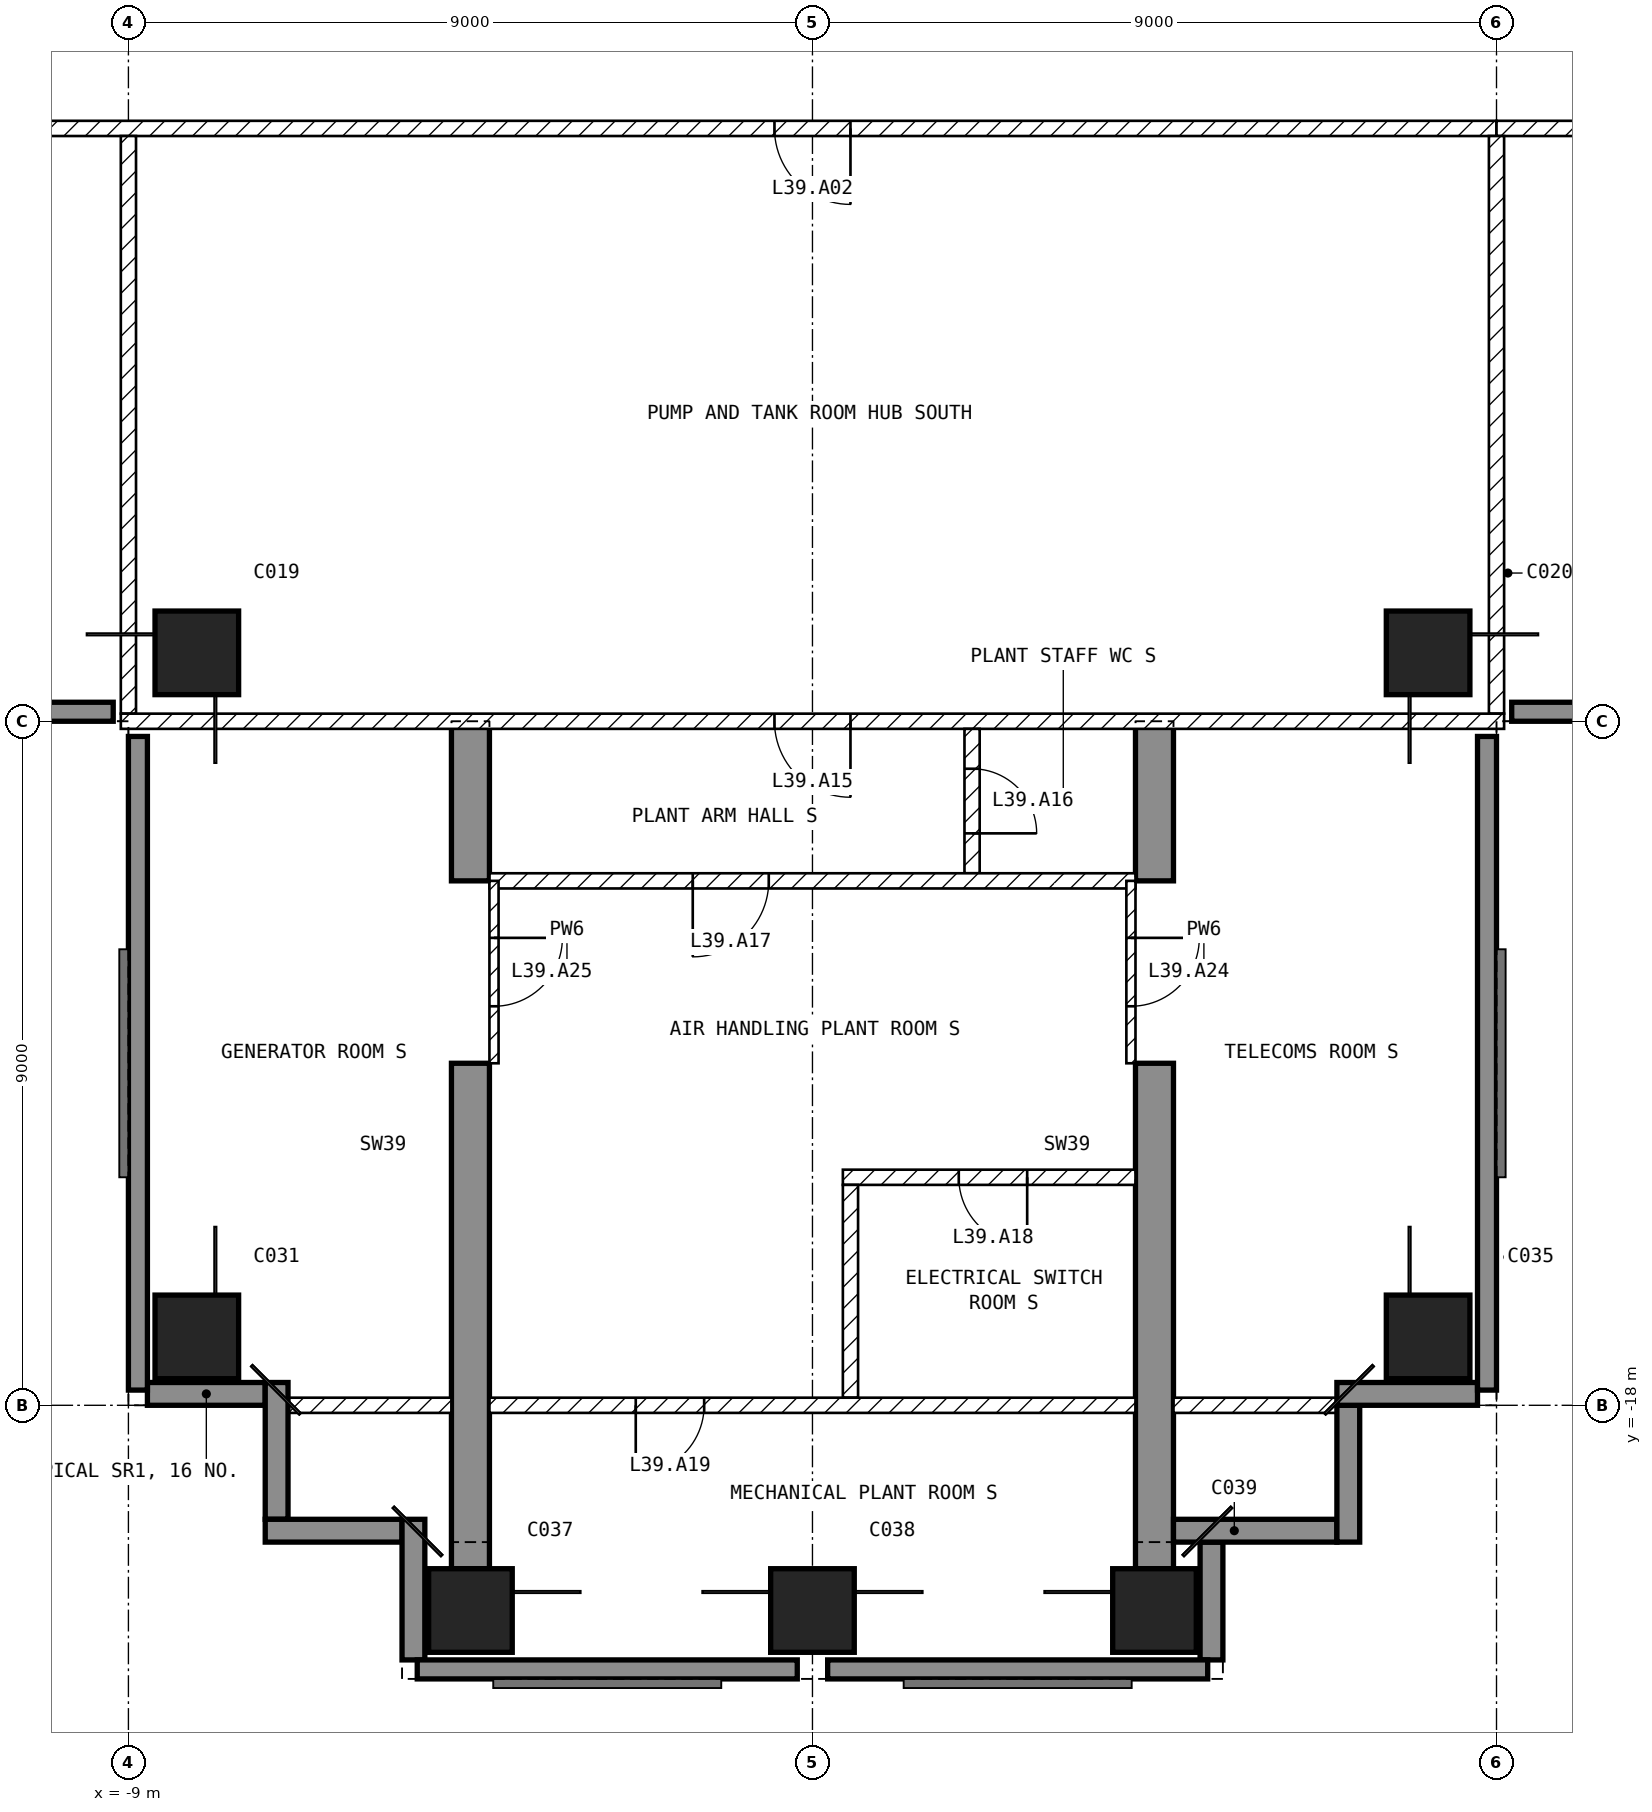
"""IFC4 building model, lengths in metres.
Left out: names, types, materials, properties, quantities, classifications, styles, units other than length and angle.
Written with IfcOpenShell. Run it as: python <this file> out.ifc"""

import sys

from ifc_helpers import new_model, si_unit, direction, frame, frame_2d, origin, origin_2d, place, context, subcontext, project, spatial, polyline, rectangle, outline, extrude, element, fill, save


model = new_model("IFC4")
c1 = context("Model", 3, precision=1e-05, world=origin(), true_north=direction((0.0, 1.0)))
c2 = subcontext(c1, "Body", "Model", "MODEL_VIEW")
j1 = project(units=[si_unit("LENGTHUNIT", "METRE"), si_unit("PLANEANGLEUNIT", "RADIAN")], contexts=[c1])
p1 = place(None, origin())
s1 = spatial("IfcSite", under=j1, at=p1, CompositionType="ELEMENT")
p2 = place(p1, origin())
s2 = spatial("IfcBuilding", under=s1, at=p2, CompositionType="ELEMENT")
p3 = place(p2, frame((0.0, 0.0, 162.1)))
s3 = spatial("IfcBuildingStorey", under=s2, at=p3, CompositionType="ELEMENT", Elevation=162.1)
for number, where, z_axis, x_axis in (
    (1, (-8.1, -17.1, -0.45), (0.0, 0.0, 1.0), (1.0, 0.0, 0.0)),
    (2, (-8.1, -8.1, -0.45), (0.0, 0.0, 1.0), (1.0, 0.0, 0.0)),
    (3, (-4.5, -20.7, -0.45), (0.0, 0.0, 1.0), (1.0, 0.0, 0.0)),
    (4, (0.0, -20.7, -0.45), (0.0, 0.0, 1.0), (1.0, 0.0, 0.0)),
    (5, (4.5, -20.7, -0.45), (0.0, 0.0, 1.0), (1.0, 0.0, 0.0)),
    (6, (8.1, -17.1, -0.45), (0.0, 0.0, 1.0), (1.0, 0.0, 0.0)),
    (7, (8.1, -8.1, -0.45), (0.0, 0.0, 1.0), (1.0, 0.0, 0.0)),
):
    element("IfcColumn", number, at=place(p3, frame(where, z_axis=z_axis, x_axis=x_axis)), inside=s3, PredefinedType="COLUMN", context=c2, shape_type="SweptSolid", body=[
        extrude(rectangle(XDim=1.1, YDim=1.1, at=origin_2d()), origin(), (0.0, 0.0, 1.0), 4.7),
    ])
for number, where, z_axis, x_axis in (
    (8, (-4.75, -20.15, -0.45), (1.0, 0.0, 0.0), (0.0, 1.0, 0.0)),
    (9, (4.25, -20.15, -0.45), (1.0, 0.0, 0.0), (0.0, 1.0, 0.0)),
):
    element("IfcWall", number, at=place(p3, frame(where, z_axis=z_axis, x_axis=x_axis)), inside=s3, PredefinedType="SHEAR", context=c2, shape_type="SweptSolid", body=[
        extrude(outline(polyline([(0.0, 0.0), (6.65, 0.0), (6.65, 2.85), (9.05, 2.85), (9.05, 0.0), (11.15, 0.0), (11.15, 4.7), (0.0, 4.7), (0.0, 0.0)])), origin(), (0.0, 0.0, 1.0), 0.5),
    ])
for number, where, z_axis, x_axis in (
    (10, (-17.8, -8.875, 0.0), (0.0, 0.0, 1.0), (1.0, 0.0, 0.0)),
    (11, (-8.875, -9.2, 0.0), (0.0, 0.0, 1.0), (0.0, -1.0, 0.0)),
):
    element("IfcWall", number, at=place(p3, frame(where, z_axis=z_axis, x_axis=x_axis)), inside=s3, PredefinedType="SOLIDWALL", context=c2, shape_type="SweptSolid", body=[
        extrude(rectangle(XDim=8.6, YDim=0.25, at=frame_2d((4.3, 0.0))), origin(), (0.0, 0.0, 1.0), 4.25),
    ])
for number, where, z_axis, x_axis in (
    (12, (-5.2, -21.475, 0.0), (0.0, 0.0, 1.0), (1.0, 0.0, 0.0)),
    (13, (0.2, -21.475, 0.0), (0.0, 0.0, 1.0), (1.0, 0.0, 0.0)),
):
    element("IfcWall", number, at=place(p3, frame(where, z_axis=z_axis, x_axis=x_axis)), inside=s3, PredefinedType="SOLIDWALL", context=c2, shape_type="SweptSolid", body=[
        extrude(rectangle(XDim=5.0, YDim=0.25, at=frame_2d((2.5, 0.0))), origin(), (0.0, 0.0, 1.0), 4.25),
    ])
for number, where, z_axis, x_axis in (
    (14, (8.875, -17.8, 0.0), (0.0, 0.0, 1.0), (0.0, 1.0, 0.0)),
    (15, (9.2, -8.875, 0.0), (0.0, 0.0, 1.0), (1.0, 0.0, 0.0)),
):
    element("IfcWall", number, at=place(p3, frame(where, z_axis=z_axis, x_axis=x_axis)), inside=s3, PredefinedType="SOLIDWALL", context=c2, shape_type="SweptSolid", body=[
        extrude(rectangle(XDim=8.6, YDim=0.25, at=frame_2d((4.3, 0.0))), origin(), (0.0, 0.0, 1.0), 4.25),
    ])
p4 = place(p3, frame((5.25, -21.35, 0.0), z_axis=(0.0, 0.0, 1.0), x_axis=(0.0, 1.0, 0.0)))
e16 = element("IfcWall", 16, at=p4, inside=s3, PredefinedType="SOLIDWALL", context=c2, shape_type="SweptSolid", body=[
    extrude(rectangle(XDim=1.55, YDim=0.3, at=frame_2d((0.775, 0.0))), origin(), (0.0, 0.0, 1.0), 4.25),
])
p5 = place(p3, frame((4.75, -19.65, 0.0), z_axis=(0.0, 0.0, 1.0), x_axis=(1.0, 0.0, 0.0)))
e17 = element("IfcWall", 17, at=p5, inside=s3, PredefinedType="SOLIDWALL", context=c2, shape_type="SweptSolid", body=[
    extrude(rectangle(XDim=2.15, YDim=0.3, at=frame_2d((1.075, 0.0))), origin(), (0.0, 0.0, 1.0), 4.25),
])
p6 = place(p3, frame((7.05, -19.8, 0.0), z_axis=(0.0, 0.0, 1.0), x_axis=(0.0, 1.0, 0.0)))
e18 = element("IfcWall", 18, at=p6, inside=s3, PredefinedType="SOLIDWALL", context=c2, shape_type="SweptSolid", body=[
    extrude(rectangle(XDim=1.8, YDim=0.3, at=frame_2d((0.9, 0.0))), origin(), (0.0, 0.0, 1.0), 4.25),
])
p7 = place(p3, frame((6.9, -17.85, 0.0), z_axis=(0.0, 0.0, 1.0), x_axis=(1.0, 0.0, 0.0)))
e19 = element("IfcWall", 19, at=p7, inside=s3, PredefinedType="SOLIDWALL", context=c2, shape_type="SweptSolid", body=[
    extrude(rectangle(XDim=1.85, YDim=0.3, at=frame_2d((0.925, 0.0))), origin(), (0.0, 0.0, 1.0), 4.25),
])
p8 = place(p3, frame((-8.75, -17.85, 0.0), z_axis=(0.0, 0.0, 1.0), x_axis=(1.0, 0.0, 0.0)))
e20 = element("IfcWall", 20, at=p8, inside=s3, PredefinedType="SOLIDWALL", context=c2, shape_type="SweptSolid", body=[
    extrude(rectangle(XDim=1.55, YDim=0.3, at=frame_2d((0.775, 0.0))), origin(), (0.0, 0.0, 1.0), 4.25),
])
for number, where, z_axis, x_axis in (
    (21, (-7.05, -17.7, 0.0), (0.0, 0.0, 1.0), (0.0, -1.0, 0.0)),
    (22, (-7.2, -19.65, 0.0), (0.0, 0.0, 1.0), (1.0, 0.0, 0.0)),
):
    element("IfcWall", number, at=place(p3, frame(where, z_axis=z_axis, x_axis=x_axis)), inside=s3, PredefinedType="SOLIDWALL", context=c2, shape_type="SweptSolid", body=[
        extrude(rectangle(XDim=1.8, YDim=0.3, at=frame_2d((0.9, 0.0))), origin(), (0.0, 0.0, 1.0), 4.25),
    ])
p9 = place(p3, frame((-5.25, -19.5, 0.0), z_axis=(0.0, 0.0, 1.0), x_axis=(0.0, -1.0, 0.0)))
e23 = element("IfcWall", 23, at=p9, inside=s3, PredefinedType="SOLIDWALL", context=c2, shape_type="SweptSolid", body=[
    extrude(rectangle(XDim=1.85, YDim=0.3, at=frame_2d((0.925, 0.0))), origin(), (0.0, 0.0, 1.0), 4.25),
])
p10 = place(p3, frame((9.0, -1.2, 0.0), z_axis=(0.0, 0.0, 1.0), x_axis=(-1.0, 0.0, 0.0)))
e24 = element("IfcWall", 24, at=p10, inside=s3, PredefinedType="PARTITIONING", context=c2, shape_type="SweptSolid", body=[
    extrude(rectangle(XDim=30.6, YDim=0.2, at=frame_2d((15.3, 0.0))), origin(), (0.0, 0.0, 1.0), 4.25),
])
p11 = place(p10, frame((8.5, 0.0, 0.0)))
e25 = element("IfcOpeningElement", 25, at=p11, cuts=e24, PredefinedType="OPENING", context=c2, shape_type="SweptSolid", body=[
    extrude(rectangle(XDim=1.0, YDim=2.1, at=frame_2d((0.5, 1.05))), frame((0.0, 0.11, 0.0), z_axis=(0.0, -1.0, 0.0), x_axis=(1.0, 0.0, 0.0)), (0.0, 0.0, 1.0), 0.22),
])
p12 = place(p10, frame((21.4, 0.0, 0.0)))
e26 = element("IfcOpeningElement", 26, at=p12, cuts=e24, PredefinedType="OPENING", context=c2, shape_type="SweptSolid", body=[
    extrude(rectangle(XDim=1.0, YDim=2.1, at=frame_2d((0.5, 1.05))), frame((0.0, 0.11, 0.0), z_axis=(0.0, -1.0, 0.0), x_axis=(1.0, 0.0, 0.0)), (0.0, 0.0, 1.0), 0.22),
])
p13 = place(p10, frame((27.35, 0.0, 0.0)))
e27 = element("IfcOpeningElement", 27, at=p13, cuts=e24, PredefinedType="OPENING", context=c2, shape_type="SweptSolid", body=[
    extrude(rectangle(XDim=1.0, YDim=2.1, at=frame_2d((0.5, 1.05))), frame((0.0, 0.11, 0.0), z_axis=(0.0, -1.0, 0.0), x_axis=(1.0, 0.0, 0.0)), (0.0, 0.0, 1.0), 0.22),
])
p14 = place(p3, frame((21.6, -1.2, 0.0), z_axis=(0.0, 0.0, 1.0), x_axis=(-1.0, 0.0, 0.0)))
e28 = element("IfcWall", 28, at=p14, inside=s3, PredefinedType="PARTITIONING", context=c2, shape_type="SweptSolid", body=[
    extrude(rectangle(XDim=12.6, YDim=0.2, at=frame_2d((6.3, 0.0))), origin(), (0.0, 0.0, 1.0), 4.25),
])
p15 = place(p14, frame((5.75, 0.0, 0.0)))
e29 = element("IfcOpeningElement", 29, at=p15, cuts=e28, PredefinedType="OPENING", context=c2, shape_type="SweptSolid", body=[
    extrude(rectangle(XDim=1.1, YDim=2.1, at=frame_2d((0.55, 1.05))), frame((0.0, 0.11, 0.0), z_axis=(0.0, -1.0, 0.0), x_axis=(1.0, 0.0, 0.0)), (0.0, 0.0, 1.0), 0.22),
])
for number, where, z_axis, x_axis in (
    (30, (9.0, -1.3, 0.0), (0.0, 0.0, 1.0), (0.0, -1.0, 0.0)),
    (31, (-9.0, -8.9, 0.0), (0.0, 0.0, 1.0), (0.0, 1.0, 0.0)),
):
    element("IfcWall", number, at=place(p3, frame(where, z_axis=z_axis, x_axis=x_axis)), inside=s3, PredefinedType="PARTITIONING", context=c2, shape_type="SweptSolid", body=[
        extrude(rectangle(XDim=7.6, YDim=0.2, at=frame_2d((3.8, 0.0))), origin(), (0.0, 0.0, 1.0), 4.25),
    ])
p16 = place(p3, frame((9.1, -9.0, 0.0), z_axis=(0.0, 0.0, 1.0), x_axis=(-1.0, 0.0, 0.0)))
e32 = element("IfcWall", 32, at=p16, inside=s3, PredefinedType="PARTITIONING", context=c2, shape_type="SweptSolid", body=[
    extrude(rectangle(XDim=18.2, YDim=0.2, at=frame_2d((9.1, 0.0))), origin(), (0.0, 0.0, 1.0), 4.25),
])
p17 = place(p16, frame((8.6, 0.0, 0.0)))
e33 = element("IfcOpeningElement", 33, at=p17, cuts=e32, PredefinedType="OPENING", context=c2, shape_type="SweptSolid", body=[
    extrude(rectangle(XDim=1.0, YDim=2.1, at=frame_2d((0.5, 1.05))), frame((0.0, 0.11, 0.0), z_axis=(0.0, -1.0, 0.0), x_axis=(1.0, 0.0, 0.0)), (0.0, 0.0, 1.0), 0.22),
])
p18 = place(p3, frame((2.1, -9.1, 0.0), z_axis=(0.0, 0.0, 1.0), x_axis=(0.0, -1.0, 0.0)))
e34 = element("IfcWall", 34, at=p18, inside=s3, PredefinedType="PARTITIONING", context=c2, shape_type="SweptSolid", body=[
    extrude(rectangle(XDim=1.9, YDim=0.2, at=frame_2d((0.95, 0.0))), origin(), (0.0, 0.0, 1.0), 4.25),
])
p19 = place(p18, frame((0.525, 0.0, 0.0)))
e35 = element("IfcOpeningElement", 35, at=p19, cuts=e34, PredefinedType="OPENING", context=c2, shape_type="SweptSolid", body=[
    extrude(rectangle(XDim=0.85, YDim=2.1, at=frame_2d((0.425, 1.05))), frame((0.0, 0.11, 0.0), z_axis=(0.0, -1.0, 0.0), x_axis=(1.0, 0.0, 0.0)), (0.0, 0.0, 1.0), 0.22),
])
p20 = place(p3, frame((4.25, -11.1, 0.0), z_axis=(0.0, 0.0, 1.0), x_axis=(-1.0, 0.0, 0.0)))
e36 = element("IfcWall", 36, at=p20, inside=s3, PredefinedType="PARTITIONING", context=c2, shape_type="SweptSolid", body=[
    extrude(rectangle(XDim=8.5, YDim=0.2, at=frame_2d((4.25, 0.0))), origin(), (0.0, 0.0, 1.0), 4.25),
])
p21 = place(p20, frame((4.825, 0.0, 0.0)))
e37 = element("IfcOpeningElement", 37, at=p21, cuts=e36, PredefinedType="OPENING", context=c2, shape_type="SweptSolid", body=[
    extrude(rectangle(XDim=1.0, YDim=2.1, at=frame_2d((0.5, 1.05))), frame((0.0, 0.11, 0.0), z_axis=(0.0, -1.0, 0.0), x_axis=(1.0, 0.0, 0.0)), (0.0, 0.0, 1.0), 0.22),
])
p22 = place(p3, frame((4.25, -15.0, 0.0), z_axis=(0.0, 0.0, 1.0), x_axis=(-1.0, 0.0, 0.0)))
e38 = element("IfcWall", 38, at=p22, inside=s3, PredefinedType="PARTITIONING", context=c2, shape_type="SweptSolid", body=[
    extrude(rectangle(XDim=3.85, YDim=0.2, at=frame_2d((1.925, 0.0))), origin(), (0.0, 0.0, 1.0), 4.25),
])
p23 = place(p22, frame((1.425, 0.0, 0.0)))
e39 = element("IfcOpeningElement", 39, at=p23, cuts=e38, PredefinedType="OPENING", context=c2, shape_type="SweptSolid", body=[
    extrude(rectangle(XDim=0.9, YDim=2.1, at=frame_2d((0.45, 1.05))), frame((0.0, 0.11, 0.0), z_axis=(0.0, -1.0, 0.0), x_axis=(1.0, 0.0, 0.0)), (0.0, 0.0, 1.0), 0.22),
])
p24 = place(p3, frame((0.5, -15.1, 0.0), z_axis=(0.0, 0.0, 1.0), x_axis=(0.0, -1.0, 0.0)))
e40 = element("IfcWall", 40, at=p24, inside=s3, PredefinedType="PARTITIONING", context=c2, shape_type="SweptSolid", body=[
    extrude(rectangle(XDim=2.8, YDim=0.2, at=frame_2d((1.4, 0.0))), origin(), (0.0, 0.0, 1.0), 4.25),
])
p25 = place(p3, frame((4.25, -18.0, 0.0), z_axis=(0.0, 0.0, 1.0), x_axis=(-1.0, 0.0, 0.0)))
e41 = element("IfcWall", 41, at=p25, inside=s3, PredefinedType="PARTITIONING", context=c2, shape_type="SweptSolid", body=[
    extrude(rectangle(XDim=8.5, YDim=0.2, at=frame_2d((4.25, 0.0))), origin(), (0.0, 0.0, 1.0), 4.25),
])
p26 = place(p25, frame((5.675, 0.0, 0.0)))
e42 = element("IfcOpeningElement", 42, at=p26, cuts=e41, PredefinedType="OPENING", context=c2, shape_type="SweptSolid", body=[
    extrude(rectangle(XDim=0.9, YDim=2.1, at=frame_2d((0.45, 1.05))), frame((0.0, 0.11, 0.0), z_axis=(0.0, -1.0, 0.0), x_axis=(1.0, 0.0, 0.0)), (0.0, 0.0, 1.0), 0.22),
])
for number, where, z_axis, x_axis in (
    (43, (6.9, -18.0, 0.0), (0.0, 0.0, 1.0), (-1.0, 0.0, 0.0)),
    (44, (-4.75, -18.0, 0.0), (0.0, 0.0, 1.0), (-1.0, 0.0, 0.0)),
):
    element("IfcWall", number, at=place(p3, frame(where, z_axis=z_axis, x_axis=x_axis)), inside=s3, PredefinedType="PARTITIONING", context=c2, shape_type="SweptSolid", body=[
        extrude(rectangle(XDim=2.15, YDim=0.2, at=frame_2d((1.075, 0.0))), origin(), (0.0, 0.0, 1.0), 4.25),
    ])
p27 = place(p3, frame((4.19, -11.1, 0.0), z_axis=(0.0, 0.0, 1.0), x_axis=(0.0, -1.0, 0.0)))
e45 = element("IfcWall", 45, at=p27, inside=s3, PredefinedType="PARTITIONING", context=c2, shape_type="SweptSolid", body=[
    extrude(rectangle(XDim=2.4, YDim=0.12, at=frame_2d((1.2, 0.0))), origin(), (0.0, 0.0, 1.0), 2.4),
])
p28 = place(p27, frame((0.75, 0.0, 0.0)))
e46 = element("IfcOpeningElement", 46, at=p28, cuts=e45, PredefinedType="OPENING", context=c2, shape_type="SweptSolid", body=[
    extrude(rectangle(XDim=0.9, YDim=2.1, at=frame_2d((0.45, 1.05))), frame((0.0, 0.07, 0.0), z_axis=(0.0, -1.0, 0.0), x_axis=(1.0, 0.0, 0.0)), (0.0, 0.0, 1.0), 0.14),
])
p29 = place(p3, frame((-4.19, -11.1, 0.0), z_axis=(0.0, 0.0, 1.0), x_axis=(0.0, -1.0, 0.0)))
e47 = element("IfcWall", 47, at=p29, inside=s3, PredefinedType="PARTITIONING", context=c2, shape_type="SweptSolid", body=[
    extrude(rectangle(XDim=2.4, YDim=0.12, at=frame_2d((1.2, 0.0))), origin(), (0.0, 0.0, 1.0), 2.4),
])
p30 = place(p29, frame((0.75, 0.0, 0.0)))
e48 = element("IfcOpeningElement", 48, at=p30, cuts=e47, PredefinedType="OPENING", context=c2, shape_type="SweptSolid", body=[
    extrude(rectangle(XDim=0.9, YDim=2.1, at=frame_2d((0.45, 1.05))), frame((0.0, 0.07, 0.0), z_axis=(0.0, -1.0, 0.0), x_axis=(1.0, 0.0, 0.0)), (0.0, 0.0, 1.0), 0.14),
])
p31 = place(p11, origin())
e49 = element("IfcDoor", 49, at=p31, inside=s3, OperationType="SINGLE_SWING_LEFT", PredefinedType="DOOR", context=c2, shape_type="SweptSolid", body=[
    extrude(rectangle(XDim=1.0, YDim=2.1, at=frame_2d((0.5, 1.05))), frame((0.0, 0.025, 0.0), z_axis=(0.0, -1.0, 0.0), x_axis=(1.0, 0.0, 0.0)), (0.0, 0.0, 1.0), 0.05),
])
fill(e25, e49)
p32 = place(p17, origin())
e50 = element("IfcDoor", 50, at=p32, inside=s3, OperationType="SINGLE_SWING_LEFT", PredefinedType="DOOR", context=c2, shape_type="SweptSolid", body=[
    extrude(rectangle(XDim=1.0, YDim=2.1, at=frame_2d((0.5, 1.05))), frame((0.0, 0.025, 0.0), z_axis=(0.0, -1.0, 0.0), x_axis=(1.0, 0.0, 0.0)), (0.0, 0.0, 1.0), 0.05),
])
fill(e33, e50)
p33 = place(p19, origin())
e51 = element("IfcDoor", 51, at=p33, inside=s3, OperationType="SINGLE_SWING_RIGHT", PredefinedType="DOOR", context=c2, shape_type="SweptSolid", body=[
    extrude(rectangle(XDim=0.85, YDim=2.1, at=frame_2d((0.425, 1.05))), frame((0.0, 0.025, 0.0), z_axis=(0.0, -1.0, 0.0), x_axis=(1.0, 0.0, 0.0)), (0.0, 0.0, 1.0), 0.05),
])
fill(e35, e51)
p34 = place(p21, origin())
e52 = element("IfcDoor", 52, at=p34, inside=s3, OperationType="SINGLE_SWING_RIGHT", PredefinedType="DOOR", context=c2, shape_type="SweptSolid", body=[
    extrude(rectangle(XDim=1.0, YDim=2.1, at=frame_2d((0.5, 1.05))), frame((0.0, 0.025, 0.0), z_axis=(0.0, -1.0, 0.0), x_axis=(1.0, 0.0, 0.0)), (0.0, 0.0, 1.0), 0.05),
])
fill(e37, e52)
p35 = place(p23, origin())
e53 = element("IfcDoor", 53, at=p35, inside=s3, OperationType="SINGLE_SWING_LEFT", PredefinedType="DOOR", context=c2, shape_type="SweptSolid", body=[
    extrude(rectangle(XDim=0.9, YDim=2.1, at=frame_2d((0.45, 1.05))), frame((0.0, 0.025, 0.0), z_axis=(0.0, -1.0, 0.0), x_axis=(1.0, 0.0, 0.0)), (0.0, 0.0, 1.0), 0.05),
])
fill(e39, e53)
p36 = place(p26, origin())
e54 = element("IfcDoor", 54, at=p36, inside=s3, OperationType="SINGLE_SWING_RIGHT", PredefinedType="DOOR", context=c2, shape_type="SweptSolid", body=[
    extrude(rectangle(XDim=0.9, YDim=2.1, at=frame_2d((0.45, 1.05))), frame((0.0, 0.025, 0.0), z_axis=(0.0, -1.0, 0.0), x_axis=(1.0, 0.0, 0.0)), (0.0, 0.0, 1.0), 0.05),
])
fill(e42, e54)
p37 = place(p28, origin())
e55 = element("IfcDoor", 55, at=p37, inside=s3, OperationType="SINGLE_SWING_LEFT", PredefinedType="DOOR", context=c2, shape_type="SweptSolid", body=[
    extrude(rectangle(XDim=0.9, YDim=2.1, at=frame_2d((0.45, 1.05))), frame((0.0, 0.025, 0.0), z_axis=(0.0, -1.0, 0.0), x_axis=(1.0, 0.0, 0.0)), (0.0, 0.0, 1.0), 0.05),
])
fill(e46, e55)
p38 = place(p30, origin())
e56 = element("IfcDoor", 56, at=p38, inside=s3, OperationType="SINGLE_SWING_LEFT", PredefinedType="DOOR", context=c2, shape_type="SweptSolid", body=[
    extrude(rectangle(XDim=0.9, YDim=2.1, at=frame_2d((0.45, 1.05))), frame((0.0, 0.025, 0.0), z_axis=(0.0, -1.0, 0.0), x_axis=(1.0, 0.0, 0.0)), (0.0, 0.0, 1.0), 0.05),
])
fill(e48, e56)
save(model, sys.argv[1])
